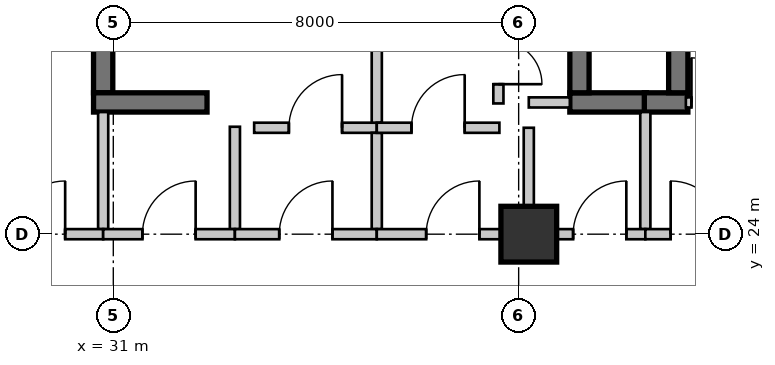
"""IFC4 building model, lengths in metres.
Left out: names, types, materials, properties, quantities, classifications, styles, units other than length and angle.
Written with IfcOpenShell. Run it as: python <this file> out.ifc"""

import sys

from ifc_helpers import new_model, si_unit, direction, frame, frame_2d, origin, origin_2d, place, context, subcontext, project, spatial, rectangle, extrude, source, transform, mapped, element, fill, save


model = new_model("IFC4")
c1 = context("Model", 3, precision=1e-05, world=origin(), true_north=direction((0.0, 1.0)))
c2 = subcontext(c1, "Body", "Model", "MODEL_VIEW")
j1 = project(units=[si_unit("LENGTHUNIT", "METRE"), si_unit("PLANEANGLEUNIT", "RADIAN")], contexts=[c1])
p1 = place(None, origin())
s1 = spatial("IfcSite", under=j1, at=p1, CompositionType="ELEMENT")
p2 = place(p1, origin())
s2 = spatial("IfcBuilding", under=s1, at=p2, CompositionType="ELEMENT")
p3 = place(p2, frame((0.0, 0.0, 12.95)))
s3 = spatial("IfcBuildingStorey", under=s2, at=p3, CompositionType="ELEMENT", Elevation=12.95)
m1 = source(origin(), c2, "Body", "SweptSolid", [
    extrude(rectangle(XDim=1.1, YDim=1.1, at=origin_2d()), origin(), (0.0, 0.0, 1.0), 3.85),
])
p4 = place(p3, frame((39.2, 24.0, 0.0), z_axis=(0.0, 0.0, 1.0), x_axis=(1.0, 0.0, 0.0)))
e1 = element("IfcColumn", 1, at=p4, inside=s3, PredefinedType="COLUMN", context=c2, shape_type="MappedRepresentation", body=[
    mapped(m1, transform((0.0, 0.0, 0.0), scale=1.0)),
])
m2 = source(origin(), c2, "Body", "SweptSolid", [
    extrude(rectangle(XDim=1.22, YDim=0.38, at=frame_2d((0.61, 0.0))), origin(), (0.0, 0.0, 1.0), 3.43),
])
p5 = place(p3, frame((30.8, 28.01, 0.0), z_axis=(0.0, 0.0, 1.0), x_axis=(0.0, -1.0, 0.0)))
e2 = element("IfcWall", 2, at=p5, inside=s3, PredefinedType="SHEAR", context=c2, shape_type="MappedRepresentation", body=[
    mapped(m2, transform((0.0, 0.0, 0.0), scale=1.0)),
])
m3 = source(origin(), c2, "Body", "SweptSolid", [
    extrude(rectangle(XDim=2.24, YDim=0.38, at=frame_2d((1.12, 0.0))), origin(), (0.0, 0.0, 1.0), 3.43),
])
p6 = place(p3, frame((30.61, 26.6, 0.0), z_axis=(0.0, 0.0, 1.0), x_axis=(1.0, 0.0, 0.0)))
e3 = element("IfcWall", 3, at=p6, inside=s3, PredefinedType="SHEAR", context=c2, shape_type="MappedRepresentation", body=[
    mapped(m3, transform((0.0, 0.0, 0.0), scale=1.0)),
])
m4 = source(origin(), c2, "Body", "SweptSolid", [
    extrude(rectangle(XDim=1.51, YDim=0.38, at=frame_2d((0.755, 0.0))), origin(), (0.0, 0.0, 1.0), 3.43),
])
p7 = place(p3, frame((40.01, 26.6, 0.0), z_axis=(0.0, 0.0, 1.0), x_axis=(1.0, 0.0, 0.0)))
e4 = element("IfcWall", 4, at=p7, inside=s3, PredefinedType="SHEAR", context=c2, shape_type="MappedRepresentation", body=[
    mapped(m4, transform((0.0, 0.0, 0.0), scale=1.0)),
])
p8 = place(p3, frame((40.2, 28.01, 0.0), z_axis=(0.0, 0.0, 1.0), x_axis=(0.0, -1.0, 0.0)))
e5 = element("IfcWall", 5, at=p8, inside=s3, PredefinedType="SHEAR", context=c2, shape_type="MappedRepresentation", body=[
    mapped(m2, transform((0.0, 0.0, 0.0), scale=1.0)),
])
m5 = source(origin(), c2, "Body", "SweptSolid", [
    extrude(rectangle(XDim=0.86, YDim=0.38, at=frame_2d((0.43, 0.0))), origin(), (0.0, 0.0, 1.0), 3.43),
])
p9 = place(p3, frame((41.48, 26.6, 0.0), z_axis=(0.0, 0.0, 1.0), x_axis=(1.0, 0.0, 0.0)))
e6 = element("IfcWall", 6, at=p9, inside=s3, PredefinedType="SHEAR", context=c2, shape_type="MappedRepresentation", body=[
    mapped(m5, transform((0.0, 0.0, 0.0), scale=1.0)),
])
p10 = place(p3, frame((42.15, 26.79, 0.0), z_axis=(0.0, 0.0, 1.0), x_axis=(0.0, 1.0, 0.0)))
e7 = element("IfcWall", 7, at=p10, inside=s3, PredefinedType="SHEAR", context=c2, shape_type="MappedRepresentation", body=[
    mapped(m2, transform((0.0, 0.0, 0.0), scale=1.0)),
])
m6 = source(origin(), c2, "Body", "SweptSolid", [
    extrude(rectangle(XDim=2.31, YDim=0.2, at=frame_2d((1.155, 0.0))), origin(), (0.0, 0.0, 1.0), 3.43),
])
p11 = place(p3, frame((30.8, 26.41, 0.0), z_axis=(0.0, 0.0, 1.0), x_axis=(0.0, -1.0, 0.0)))
e8 = element("IfcWall", 8, at=p11, inside=s3, PredefinedType="SOLIDWALL", context=c2, shape_type="MappedRepresentation", body=[
    mapped(m6, transform((0.0, 0.0, 0.0), scale=1.0)),
])
m7 = source(origin(), c2, "Body", "SweptSolid", [
    extrude(rectangle(XDim=4.35, YDim=0.2, at=frame_2d((2.175, 0.0))), origin(), (0.0, 0.0, 1.0), 2.97),
])
p12 = place(p3, frame((30.8, 24.0, 0.0), z_axis=(0.0, 0.0, 1.0), x_axis=(-1.0, 0.0, 0.0)))
e9 = element("IfcWall", 9, at=p12, inside=s3, PredefinedType="SOLIDWALL", context=c2, shape_type="MappedRepresentation", body=[
    mapped(m7, transform((0.0, 0.0, 0.0), scale=1.0)),
])
m8 = source(origin(), c2, "Body", "SweptSolid", [
    extrude(rectangle(XDim=1.05, YDim=2.1, at=frame_2d((0.525, 1.05))), frame((0.0, 0.11, 0.0), z_axis=(0.0, -1.0, 0.0), x_axis=(1.0, 0.0, 0.0)), (0.0, 0.0, 1.0), 0.22),
])
p13 = place(p12, frame((0.75, 0.0, 0.0)))
e10 = element("IfcOpeningElement", 10, at=p13, cuts=e9, PredefinedType="OPENING", context=c2, shape_type="MappedRepresentation", body=[
    mapped(m8, transform((0.0, 0.0, 0.0), scale=1.0)),
])
m9 = source(origin(), c2, "Body", "SweptSolid", [
    extrude(rectangle(XDim=2.02, YDim=0.2, at=frame_2d((1.01, 0.0))), origin(), (0.0, 0.0, 1.0), 3.43),
])
p14 = place(p3, frame((33.4, 26.12, 0.0), z_axis=(0.0, 0.0, 1.0), x_axis=(0.0, -1.0, 0.0)))
e11 = element("IfcWall", 11, at=p14, inside=s3, PredefinedType="SOLIDWALL", context=c2, shape_type="MappedRepresentation", body=[
    mapped(m9, transform((0.0, 0.0, 0.0), scale=1.0)),
])
m10 = source(origin(), c2, "Body", "SweptSolid", [
    extrude(rectangle(XDim=2.6, YDim=0.2, at=frame_2d((1.3, 0.0))), origin(), (0.0, 0.0, 1.0), 2.97),
])
p15 = place(p3, frame((33.4, 24.0, 0.0), z_axis=(0.0, 0.0, 1.0), x_axis=(-1.0, 0.0, 0.0)))
e12 = element("IfcWall", 12, at=p15, inside=s3, PredefinedType="SOLIDWALL", context=c2, shape_type="MappedRepresentation", body=[
    mapped(m10, transform((0.0, 0.0, 0.0), scale=1.0)),
])
p16 = place(p15, frame((0.775, 0.0, 0.0)))
e13 = element("IfcOpeningElement", 13, at=p16, cuts=e12, PredefinedType="OPENING", context=c2, shape_type="MappedRepresentation", body=[
    mapped(m8, transform((0.0, 0.0, 0.0), scale=1.0)),
])
m11 = source(origin(), c2, "Body", "SweptSolid", [
    extrude(rectangle(XDim=2.42, YDim=0.2, at=frame_2d((1.21, 0.0))), origin(), (0.0, 0.0, 1.0), 3.43),
])
p17 = place(p3, frame((33.78, 26.1, 0.0), z_axis=(0.0, 0.0, 1.0), x_axis=(1.0, 0.0, 0.0)))
e14 = element("IfcWall", 14, at=p17, inside=s3, PredefinedType="SOLIDWALL", context=c2, shape_type="MappedRepresentation", body=[
    mapped(m11, transform((0.0, 0.0, 0.0), scale=1.0)),
])
p18 = place(p17, frame((0.685, 0.0, 0.0)))
e15 = element("IfcOpeningElement", 15, at=p18, cuts=e14, PredefinedType="OPENING", context=c2, shape_type="MappedRepresentation", body=[
    mapped(m8, transform((0.0, 0.0, 0.0), scale=1.0)),
])
m12 = source(origin(), c2, "Body", "SweptSolid", [
    extrude(rectangle(XDim=1.9, YDim=0.2, at=frame_2d((0.95, 0.0))), origin(), (0.0, 0.0, 1.0), 3.43),
])
p19 = place(p3, frame((36.2, 26.0, 0.0), z_axis=(0.0, 0.0, 1.0), x_axis=(0.0, -1.0, 0.0)))
e16 = element("IfcWall", 16, at=p19, inside=s3, PredefinedType="SOLIDWALL", context=c2, shape_type="MappedRepresentation", body=[
    mapped(m12, transform((0.0, 0.0, 0.0), scale=1.0)),
])
m13 = source(origin(), c2, "Body", "SweptSolid", [
    extrude(rectangle(XDim=2.8, YDim=0.2, at=frame_2d((1.4, 0.0))), origin(), (0.0, 0.0, 1.0), 2.97),
])
p20 = place(p3, frame((36.2, 24.0, 0.0), z_axis=(0.0, 0.0, 1.0), x_axis=(-1.0, 0.0, 0.0)))
e17 = element("IfcWall", 17, at=p20, inside=s3, PredefinedType="SOLIDWALL", context=c2, shape_type="MappedRepresentation", body=[
    mapped(m13, transform((0.0, 0.0, 0.0), scale=1.0)),
])
p21 = place(p20, frame((0.875, 0.0, 0.0)))
e18 = element("IfcOpeningElement", 18, at=p21, cuts=e17, PredefinedType="OPENING", context=c2, shape_type="MappedRepresentation", body=[
    mapped(m8, transform((0.0, 0.0, 0.0), scale=1.0)),
])
m14 = source(origin(), c2, "Body", "SweptSolid", [
    extrude(rectangle(XDim=1.9, YDim=0.2, at=frame_2d((0.95, 0.0))), origin(), (0.0, 0.0, 1.0), 3.43),
])
p22 = place(p3, frame((36.2, 28.1, 0.0), z_axis=(0.0, 0.0, 1.0), x_axis=(0.0, -1.0, 0.0)))
e19 = element("IfcWall", 19, at=p22, inside=s3, PredefinedType="SOLIDWALL", context=c2, shape_type="MappedRepresentation", body=[
    mapped(m14, transform((0.0, 0.0, 0.0), scale=1.0)),
])
m15 = source(origin(), c2, "Body", "SweptSolid", [
    extrude(rectangle(XDim=2.42, YDim=0.2, at=frame_2d((1.21, 0.0))), origin(), (0.0, 0.0, 1.0), 3.43),
])
p23 = place(p3, frame((36.2, 26.1, 0.0), z_axis=(0.0, 0.0, 1.0), x_axis=(1.0, 0.0, 0.0)))
e20 = element("IfcWall", 20, at=p23, inside=s3, PredefinedType="SOLIDWALL", context=c2, shape_type="MappedRepresentation", body=[
    mapped(m15, transform((0.0, 0.0, 0.0), scale=1.0)),
])
p24 = place(p23, frame((0.685, 0.0, 0.0)))
e21 = element("IfcOpeningElement", 21, at=p24, cuts=e20, PredefinedType="OPENING", context=c2, shape_type="MappedRepresentation", body=[
    mapped(m8, transform((0.0, 0.0, 0.0), scale=1.0)),
])
m16 = source(origin(), c2, "Body", "SweptSolid", [
    extrude(rectangle(XDim=2.0, YDim=0.2, at=frame_2d((1.0, 0.0))), origin(), (0.0, 0.0, 1.0), 2.97),
])
p25 = place(p3, frame((39.2, 26.1, 0.0), z_axis=(0.0, 0.0, 1.0), x_axis=(0.0, -1.0, 0.0)))
e22 = element("IfcWall", 22, at=p25, inside=s3, PredefinedType="SOLIDWALL", context=c2, shape_type="MappedRepresentation", body=[
    mapped(m16, transform((0.0, 0.0, 0.0), scale=1.0)),
])
m17 = source(origin(), c2, "Body", "SweptSolid", [
    extrude(rectangle(XDim=3.0, YDim=0.2, at=frame_2d((1.5, 0.0))), origin(), (0.0, 0.0, 1.0), 2.97),
])
p26 = place(p3, frame((39.2, 24.0, 0.0), z_axis=(0.0, 0.0, 1.0), x_axis=(-1.0, 0.0, 0.0)))
e23 = element("IfcWall", 23, at=p26, inside=s3, PredefinedType="SOLIDWALL", context=c2, shape_type="MappedRepresentation", body=[
    mapped(m17, transform((0.0, 0.0, 0.0), scale=1.0)),
])
p27 = place(p26, frame((0.975, 0.0, 0.0)))
e24 = element("IfcOpeningElement", 24, at=p27, cuts=e23, PredefinedType="OPENING", context=c2, shape_type="MappedRepresentation", body=[
    mapped(m8, transform((0.0, 0.0, 0.0), scale=1.0)),
])
m18 = source(origin(), c2, "Body", "SweptSolid", [
    extrude(rectangle(XDim=1.43, YDim=0.2, at=frame_2d((0.715, 0.0))), origin(), (0.0, 0.0, 1.0), 3.43),
])
p28 = place(p3, frame((38.6, 28.01, 0.0), z_axis=(0.0, 0.0, 1.0), x_axis=(0.0, -1.0, 0.0)))
e25 = element("IfcWall", 25, at=p28, inside=s3, PredefinedType="SOLIDWALL", context=c2, shape_type="MappedRepresentation", body=[
    mapped(m18, transform((0.0, 0.0, 0.0), scale=1.0)),
])
m19 = source(origin(), c2, "Body", "SweptSolid", [
    extrude(rectangle(XDim=0.86, YDim=2.1, at=frame_2d((0.43, 1.05))), frame((0.0, 0.11, 0.0), z_axis=(0.0, -1.0, 0.0), x_axis=(1.0, 0.0, 0.0)), (0.0, 0.0, 1.0), 0.22),
])
p29 = place(p28, frame((0.19, 0.0, 0.0)))
e26 = element("IfcOpeningElement", 26, at=p29, cuts=e25, PredefinedType="OPENING", context=c2, shape_type="MappedRepresentation", body=[
    mapped(m19, transform((0.0, 0.0, 0.0), scale=1.0)),
])
m20 = source(origin(), c2, "Body", "SweptSolid", [
    extrude(rectangle(XDim=0.81, YDim=0.2, at=frame_2d((0.405, 0.0))), origin(), (0.0, 0.0, 1.0), 3.43),
])
p30 = place(p3, frame((39.2, 26.6, 0.0), z_axis=(0.0, 0.0, 1.0), x_axis=(1.0, 0.0, 0.0)))
e27 = element("IfcWall", 27, at=p30, inside=s3, PredefinedType="SOLIDWALL", context=c2, shape_type="MappedRepresentation", body=[
    mapped(m20, transform((0.0, 0.0, 0.0), scale=1.0)),
])
p31 = place(p3, frame((41.5, 26.41, 0.0), z_axis=(0.0, 0.0, 1.0), x_axis=(0.0, -1.0, 0.0)))
e28 = element("IfcWall", 28, at=p31, inside=s3, PredefinedType="SOLIDWALL", context=c2, shape_type="MappedRepresentation", body=[
    mapped(m6, transform((0.0, 0.0, 0.0), scale=1.0)),
])
m21 = source(origin(), c2, "Body", "SweptSolid", [
    extrude(rectangle(XDim=2.3, YDim=0.2, at=frame_2d((1.15, 0.0))), origin(), (0.0, 0.0, 1.0), 2.897),
])
p32 = place(p3, frame((41.5, 24.0, 0.0), z_axis=(0.0, 0.0, 1.0), x_axis=(-1.0, 0.0, 0.0)))
e29 = element("IfcWall", 29, at=p32, inside=s3, PredefinedType="SOLIDWALL", context=c2, shape_type="MappedRepresentation", body=[
    mapped(m21, transform((0.0, 0.0, 0.0), scale=1.0)),
])
p33 = place(p32, frame((0.375, 0.0, 0.0)))
e30 = element("IfcOpeningElement", 30, at=p33, cuts=e29, PredefinedType="OPENING", context=c2, shape_type="MappedRepresentation", body=[
    mapped(m8, transform((0.0, 0.0, 0.0), scale=1.0)),
])
m22 = source(origin(), c2, "Body", "SweptSolid", [
    extrude(rectangle(XDim=1.25, YDim=0.2, at=frame_2d((0.625, 0.0))), origin(), (0.0, 0.0, 1.0), 3.43),
])
p34 = place(p3, frame((42.3, 26.6, 0.0), z_axis=(0.0, 0.0, 1.0), x_axis=(1.0, 0.0, 0.0)))
e31 = element("IfcWall", 31, at=p34, inside=s3, PredefinedType="SOLIDWALL", context=c2, shape_type="MappedRepresentation", body=[
    mapped(m22, transform((0.0, 0.0, 0.0), scale=1.0)),
])
m23 = source(origin(), c2, "Body", "SweptSolid", [
    extrude(rectangle(XDim=0.88, YDim=2.1, at=frame_2d((0.44, 1.05))), frame((0.0, 0.11, 0.0), z_axis=(0.0, -1.0, 0.0), x_axis=(1.0, 0.0, 0.0)), (0.0, 0.0, 1.0), 0.22),
])
p35 = place(p34, frame((0.11, 0.0, 0.0)))
e32 = element("IfcOpeningElement", 32, at=p35, cuts=e31, PredefinedType="OPENING", context=c2, shape_type="MappedRepresentation", body=[
    mapped(m23, transform((0.0, 0.0, 0.0), scale=1.0)),
])
m24 = source(origin(), c2, "Body", "SweptSolid", [
    extrude(rectangle(XDim=2.05, YDim=0.2, at=frame_2d((1.025, 0.0))), origin(), (0.0, 0.0, 1.0), 2.897),
])
p36 = place(p3, frame((43.55, 24.0, 0.0), z_axis=(0.0, 0.0, 1.0), x_axis=(-1.0, 0.0, 0.0)))
e33 = element("IfcWall", 33, at=p36, inside=s3, PredefinedType="SOLIDWALL", context=c2, shape_type="MappedRepresentation", body=[
    mapped(m24, transform((0.0, 0.0, 0.0), scale=1.0)),
])
p37 = place(p36, frame((0.5, 0.0, 0.0)))
e34 = element("IfcOpeningElement", 34, at=p37, cuts=e33, PredefinedType="OPENING", context=c2, shape_type="MappedRepresentation", body=[
    mapped(m8, transform((0.0, 0.0, 0.0), scale=1.0)),
])
m25 = source(origin(), c2, "Body", "SweptSolid", [
    extrude(rectangle(XDim=1.05, YDim=2.1, at=frame_2d((0.525, 1.05))), frame((0.0, 0.025, 0.0), z_axis=(0.0, -1.0, 0.0), x_axis=(1.0, 0.0, 0.0)), (0.0, 0.0, 1.0), 0.05),
])
p38 = place(p13, frame((1.05, 0.0, 0.0), z_axis=(0.0, 0.0, 1.0), x_axis=(-1.0, 0.0, 0.0)))
e35 = element("IfcDoor", 35, at=p38, inside=s3, OperationType="SINGLE_SWING_RIGHT", PredefinedType="DOOR", context=c2, shape_type="MappedRepresentation", body=[
    mapped(m25, transform((0.0, 0.0, 0.0), scale=1.0)),
])
fill(e10, e35)
p39 = place(p16, frame((1.05, 0.0, 0.0), z_axis=(0.0, 0.0, 1.0), x_axis=(-1.0, 0.0, 0.0)))
e36 = element("IfcDoor", 36, at=p39, inside=s3, OperationType="SINGLE_SWING_RIGHT", PredefinedType="DOOR", context=c2, shape_type="MappedRepresentation", body=[
    mapped(m25, transform((0.0, 0.0, 0.0), scale=1.0)),
])
fill(e13, e36)
p40 = place(p18, origin())
e37 = element("IfcDoor", 37, at=p40, inside=s3, OperationType="SINGLE_SWING_RIGHT", PredefinedType="DOOR", context=c2, shape_type="MappedRepresentation", body=[
    mapped(m25, transform((0.0, 0.0, 0.0), scale=1.0)),
])
fill(e15, e37)
p41 = place(p21, frame((1.05, 0.0, 0.0), z_axis=(0.0, 0.0, 1.0), x_axis=(-1.0, 0.0, 0.0)))
e38 = element("IfcDoor", 38, at=p41, inside=s3, OperationType="SINGLE_SWING_RIGHT", PredefinedType="DOOR", context=c2, shape_type="MappedRepresentation", body=[
    mapped(m25, transform((0.0, 0.0, 0.0), scale=1.0)),
])
fill(e18, e38)
p42 = place(p24, origin())
e39 = element("IfcDoor", 39, at=p42, inside=s3, OperationType="SINGLE_SWING_RIGHT", PredefinedType="DOOR", context=c2, shape_type="MappedRepresentation", body=[
    mapped(m25, transform((0.0, 0.0, 0.0), scale=1.0)),
])
fill(e21, e39)
p43 = place(p27, frame((1.05, 0.0, 0.0), z_axis=(0.0, 0.0, 1.0), x_axis=(-1.0, 0.0, 0.0)))
e40 = element("IfcDoor", 40, at=p43, inside=s3, OperationType="SINGLE_SWING_RIGHT", PredefinedType="DOOR", context=c2, shape_type="MappedRepresentation", body=[
    mapped(m25, transform((0.0, 0.0, 0.0), scale=1.0)),
])
fill(e24, e40)
p44 = place(p33, frame((1.05, 0.0, 0.0), z_axis=(0.0, 0.0, 1.0), x_axis=(-1.0, 0.0, 0.0)))
e41 = element("IfcDoor", 41, at=p44, inside=s3, OperationType="SINGLE_SWING_RIGHT", PredefinedType="DOOR", context=c2, shape_type="MappedRepresentation", body=[
    mapped(m25, transform((0.0, 0.0, 0.0), scale=1.0)),
])
fill(e30, e41)
m26 = source(origin(), c2, "Body", "SweptSolid", [
    extrude(rectangle(XDim=0.88, YDim=2.1, at=frame_2d((0.44, 1.05))), frame((0.0, 0.025, 0.0), z_axis=(0.0, -1.0, 0.0), x_axis=(1.0, 0.0, 0.0)), (0.0, 0.0, 1.0), 0.05),
])
p45 = place(p35, origin())
e42 = element("IfcDoor", 42, at=p45, inside=s3, OperationType="SINGLE_SWING_LEFT", PredefinedType="DOOR", context=c2, shape_type="MappedRepresentation", body=[
    mapped(m26, transform((0.0, 0.0, 0.0), scale=1.0)),
])
fill(e32, e42)
p46 = place(p37, frame((1.05, 0.0, 0.0), z_axis=(0.0, 0.0, 1.0), x_axis=(-1.0, 0.0, 0.0)))
e43 = element("IfcDoor", 43, at=p46, inside=s3, OperationType="SINGLE_SWING_LEFT", PredefinedType="DOOR", context=c2, shape_type="MappedRepresentation", body=[
    mapped(m25, transform((0.0, 0.0, 0.0), scale=1.0)),
])
fill(e34, e43)
m27 = source(origin(), c2, "Body", "SweptSolid", [
    extrude(rectangle(XDim=0.86, YDim=2.1, at=frame_2d((0.43, 1.05))), frame((0.0, 0.025, 0.0), z_axis=(0.0, -1.0, 0.0), x_axis=(1.0, 0.0, 0.0)), (0.0, 0.0, 1.0), 0.05),
])
p47 = place(p29, origin())
e44 = element("IfcDoor", 44, at=p47, inside=s3, OperationType="SINGLE_SWING_RIGHT", PredefinedType="DOOR", context=c2, shape_type="MappedRepresentation", body=[
    mapped(m27, transform((0.0, 0.0, 0.0), scale=1.0)),
])
fill(e26, e44)
save(model, sys.argv[1])
